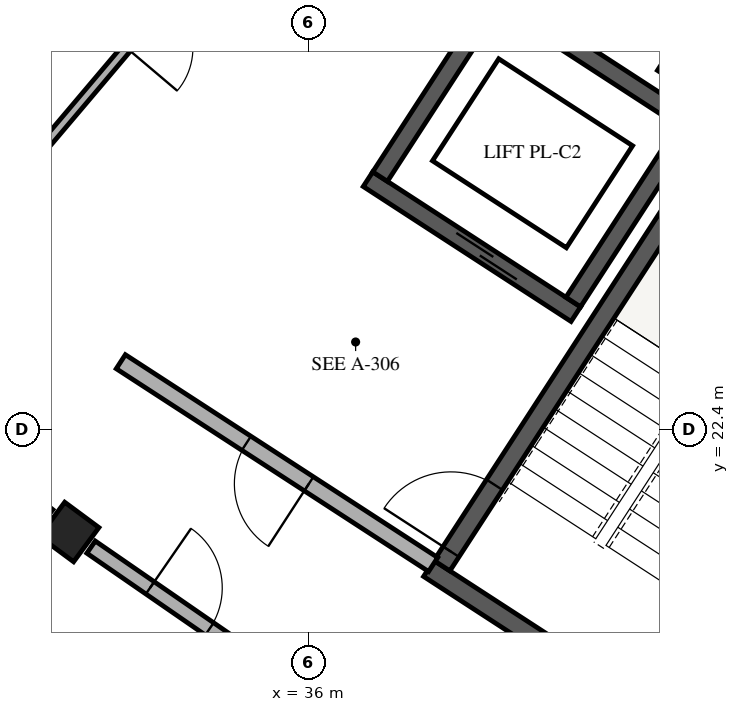
"""IFC4 building model, lengths in metres.
Left out: names, types, materials, properties, quantities, classifications, styles, units other than length and angle.
Written with IfcOpenShell. Run it as: python <this file> out.ifc"""

import sys

from ifc_helpers import new_model, si_unit, direction, frame, frame_2d, origin, origin_2d, place, context, subcontext, project, spatial, rectangle, extrude, element, fill, save


model = new_model("IFC4")
c1 = context("Model", 3, precision=1e-05, world=origin(), true_north=direction((0.0, 1.0)))
c2 = subcontext(c1, "Body", "Model", "MODEL_VIEW")
j1 = project(units=[si_unit("LENGTHUNIT", "METRE"), si_unit("PLANEANGLEUNIT", "RADIAN")], contexts=[c1])
p1 = place(None, origin())
s1 = spatial("IfcSite", under=j1, at=p1, CompositionType="ELEMENT")
p2 = place(p1, origin())
s2 = spatial("IfcBuilding", under=s1, at=p2, CompositionType="ELEMENT")
p3 = place(p2, frame((0.0, 0.0, 8.84)))
s3 = spatial("IfcBuildingStorey", under=s2, at=p3, CompositionType="ELEMENT", Elevation=8.84)
p4 = place(p3, frame((40.413, 18.882, 0.0), z_axis=(0.0, 0.0, 1.0), x_axis=(0.544629435258, 0.838676802022, 0.0)))
e1 = element("IfcWall", 1, at=p4, inside=s3, PredefinedType="SHEAR", context=c2, shape_type="SweptSolid", body=[
    extrude(rectangle(XDim=6.6, YDim=0.25, at=frame_2d((3.3, 0.0))), origin(), (0.0, 0.0, 1.0), 3.11),
])
p5 = place(p3, frame((40.449, 18.709, 0.0), z_axis=(0.0, 0.0, 1.0), x_axis=(-0.838678407117, 0.544626963559, 0.0)))
e2 = element("IfcWall", 2, at=p5, inside=s3, PredefinedType="SHEAR", context=c2, shape_type="SweptSolid", body=[
    extrude(rectangle(XDim=3.42, YDim=0.25, at=frame_2d((1.71, 0.0))), origin(), (0.0, 0.0, 1.0), 3.11),
])
p6 = place(p3, frame((37.754, 20.608, 0.0), z_axis=(0.0, 0.0, 1.0), x_axis=(0.544655453679, 0.838659905312, 0.0)))
e3 = element("IfcWall", 3, at=p6, inside=s3, PredefinedType="SHEAR", context=c2, shape_type="SweptSolid", body=[
    extrude(rectangle(XDim=6.6, YDim=0.25, at=frame_2d((3.3, 0.0))), origin(), (0.0, 0.0, 1.0), 3.11),
])
p7 = place(p6, frame((0.22, 0.0, 0.0)))
e4 = element("IfcOpeningElement", 4, at=p7, cuts=e3, PredefinedType="OPENING", context=c2, shape_type="SweptSolid", body=[
    extrude(rectangle(XDim=1.05, YDim=2.15, at=frame_2d((0.525, 1.075))), frame((0.0, 0.135, 0.0), z_axis=(0.0, -1.0, 0.0), x_axis=(1.0, 0.0, 0.0)), (0.0, 0.0, 1.0), 0.27),
])
p8 = place(p3, frame((39.516, 23.917, 0.0), z_axis=(0.0, 0.0, 1.0), x_axis=(-0.838660840752, 0.544654013286, 0.0)))
e5 = element("IfcWall", 5, at=p8, inside=s3, PredefinedType="SHEAR", context=c2, shape_type="SweptSolid", body=[
    extrude(rectangle(XDim=3.26, YDim=0.23, at=frame_2d((1.63, 0.0))), origin(), (0.0, 0.0, 1.0), 3.11),
])
p9 = place(p8, frame((0.9, 0.0, 0.0)))
e6 = element("IfcOpeningElement", 6, at=p9, cuts=e5, PredefinedType="OPENING", context=c2, shape_type="SweptSolid", body=[
    extrude(rectangle(XDim=1.0, YDim=2.15, at=frame_2d((0.5, 1.075))), frame((0.0, 0.125, 0.0), z_axis=(0.0, -1.0, 0.0), x_axis=(1.0, 0.0, 0.0)), (0.0, 0.0, 1.0), 0.25),
])
p10 = place(p3, frame((41.112, 26.375, 0.0), z_axis=(0.0, 0.0, 1.0), x_axis=(-0.838638623546, 0.544688221919, 0.0)))
e7 = element("IfcWall", 7, at=p10, inside=s3, PredefinedType="SHEAR", context=c2, shape_type="SweptSolid", body=[
    extrude(rectangle(XDim=3.26, YDim=0.23, at=frame_2d((1.63, 0.0))), origin(), (0.0, 0.0, 1.0), 3.11),
])
p11 = place(p3, frame((39.482, 24.077, 0.0), z_axis=(0.0, 0.0, 1.0), x_axis=(0.544686387605, 0.838639814913, 0.0)))
e8 = element("IfcWall", 8, at=p11, inside=s3, PredefinedType="SHEAR", context=c2, shape_type="SweptSolid", body=[
    extrude(rectangle(XDim=2.7, YDim=0.23, at=frame_2d((1.35, 0.0))), origin(), (0.0, 0.0, 1.0), 3.11),
])
p12 = place(p3, frame((36.941, 25.727, 0.0), z_axis=(0.0, 0.0, 1.0), x_axis=(0.544622789439, 0.838681117722, 0.0)))
e9 = element("IfcWall", 9, at=p12, inside=s3, PredefinedType="SHEAR", context=c2, shape_type="SweptSolid", body=[
    extrude(rectangle(XDim=2.7, YDim=0.23, at=frame_2d((1.35, 0.0))), origin(), (0.0, 0.0, 1.0), 3.11),
])
p13 = place(p3, frame((32.85, 21.052, 0.0), z_axis=(0.0, 0.0, 1.0), x_axis=(-0.594822786751, -0.803856860617, 0.0)))
e10 = element("IfcColumn", 10, at=p13, inside=s3, PredefinedType="COLUMN", context=c2, shape_type="SweptSolid", body=[
    extrude(rectangle(XDim=0.56, YDim=0.56, at=origin_2d()), origin(), (0.0, 0.0, 1.0), 3.105),
])
p14 = place(p3, frame((40.954, 27.116, 0.0), z_axis=(0.0, 0.0, 1.0), x_axis=(-0.540974471368, -0.841039012964, 0.0)))
e11 = element("IfcColumn", 11, at=p14, inside=s3, PredefinedType="PILASTER", context=c2, shape_type="SweptSolid", body=[
    extrude(rectangle(XDim=0.38, YDim=0.62, at=origin_2d()), origin(), (0.0, 0.0, 1.0), 3.105),
])
p15 = place(p3, frame((37.639, 20.623, 0.0), z_axis=(0.0, 0.0, 1.0), x_axis=(-0.838681446513, 0.544622283124, 0.0)))
e12 = element("IfcWall", 12, at=p15, inside=s3, PredefinedType="PARTITIONING", context=c2, shape_type="SweptSolid", body=[
    extrude(rectangle(XDim=4.9, YDim=0.22, at=frame_2d((2.45, 0.0))), origin(), (0.0, 0.0, 1.0), 2.34),
])
p16 = place(p15, frame((1.95, 0.0, 0.0)))
e13 = element("IfcOpeningElement", 13, at=p16, cuts=e12, PredefinedType="OPENING", context=c2, shape_type="SweptSolid", body=[
    extrude(rectangle(XDim=0.98, YDim=2.14, at=frame_2d((0.49, 1.07))), frame((0.0, 0.12, 0.0), z_axis=(0.0, -1.0, 0.0), x_axis=(1.0, 0.0, 0.0)), (0.0, 0.0, 1.0), 0.24),
])
p17 = place(p3, frame((36.021, 30.269, 0.0), z_axis=(0.0, 0.0, 1.0), x_axis=(-0.646121311019, -0.763234728932, 0.0)))
e14 = element("IfcWall", 14, at=p17, inside=s3, PredefinedType="PARTITIONING", context=c2, shape_type="SweptSolid", body=[
    extrude(rectangle(XDim=6.6, YDim=0.125, at=frame_2d((3.3, 0.0))), origin(), (0.0, 0.0, 1.0), 2.37),
])
p18 = place(p17, frame((2.865, 0.0, 0.0)))
e15 = element("IfcOpeningElement", 15, at=p18, cuts=e14, PredefinedType="OPENING", context=c2, shape_type="SweptSolid", body=[
    extrude(rectangle(XDim=0.87, YDim=2.08, at=frame_2d((0.435, 1.04))), frame((0.0, 0.073, 0.0), z_axis=(0.0, -1.0, 0.0), x_axis=(1.0, 0.0, 0.0)), (0.0, 0.0, 1.0), 0.145),
])
p19 = place(p3, frame((30.351, 23.03, 0.0), z_axis=(0.0, 0.0, 1.0), x_axis=(0.783965548427, -0.620804332201, 0.0)))
e16 = element("IfcWall", 16, at=p19, inside=s3, PredefinedType="PARTITIONING", context=c2, shape_type="SweptSolid", body=[
    extrude(rectangle(XDim=2.837, YDim=0.195, at=frame_2d((1.418, 0.0))), origin(), (0.0, 0.0, 1.0), 2.37),
])
p20 = place(p19, frame((0.934, 0.0, 0.0)))
e17 = element("IfcOpeningElement", 17, at=p20, cuts=e16, PredefinedType="OPENING", context=c2, shape_type="SweptSolid", body=[
    extrude(rectangle(XDim=0.97, YDim=2.15, at=frame_2d((0.485, 1.075))), frame((0.0, 0.107, 0.0), z_axis=(0.0, -1.0, 0.0), x_axis=(1.0, 0.0, 0.0)), (0.0, 0.0, 1.0), 0.215),
])
p21 = place(p3, frame((33.138, 20.853, 0.0), z_axis=(0.0, 0.0, 1.0), x_axis=(0.822870075235, -0.568229565653, 0.0)))
e18 = element("IfcWall", 18, at=p21, inside=s3, PredefinedType="PARTITIONING", context=c2, shape_type="SweptSolid", body=[
    extrude(rectangle(XDim=2.837, YDim=0.195, at=frame_2d((1.418, 0.0))), origin(), (0.0, 0.0, 1.0), 2.37),
])
p22 = place(p21, frame((0.944, 0.0, 0.0)))
e19 = element("IfcOpeningElement", 19, at=p22, cuts=e18, PredefinedType="OPENING", context=c2, shape_type="SweptSolid", body=[
    extrude(rectangle(XDim=0.95, YDim=2.13, at=frame_2d((0.475, 1.065))), frame((0.0, 0.107, 0.0), z_axis=(0.0, -1.0, 0.0), x_axis=(1.0, 0.0, 0.0)), (0.0, 0.0, 1.0), 0.215),
])
p23 = place(p7, origin())
e20 = element("IfcDoor", 20, at=p23, inside=s3, OperationType="SINGLE_SWING_LEFT", PredefinedType="DOOR", context=c2, shape_type="SweptSolid", body=[
    extrude(rectangle(XDim=1.05, YDim=2.15, at=frame_2d((0.525, 1.075))), frame((0.0, 0.025, 0.0), z_axis=(0.0, -1.0, 0.0), x_axis=(1.0, 0.0, 0.0)), (0.0, 0.0, 1.0), 0.05),
])
fill(e4, e20)
p24 = place(p9, origin())
e21 = element("IfcDoor", 21, at=p24, inside=s3, OperationType="DOUBLE_DOOR_SLIDING", PredefinedType="DOOR", context=c2, shape_type="SweptSolid", body=[
    extrude(rectangle(XDim=1.0, YDim=2.15, at=frame_2d((0.5, 1.075))), frame((0.0, 0.025, 0.0), z_axis=(0.0, -1.0, 0.0), x_axis=(1.0, 0.0, 0.0)), (0.0, 0.0, 1.0), 0.05),
])
fill(e6, e21)
p25 = place(p16, origin())
e22 = element("IfcDoor", 22, at=p25, inside=s3, OperationType="SINGLE_SWING_LEFT", PredefinedType="DOOR", context=c2, shape_type="SweptSolid", body=[
    extrude(rectangle(XDim=0.98, YDim=2.14, at=frame_2d((0.49, 1.07))), frame((0.0, 0.025, 0.0), z_axis=(0.0, -1.0, 0.0), x_axis=(1.0, 0.0, 0.0)), (0.0, 0.0, 1.0), 0.05),
])
fill(e13, e22)
p26 = place(p22, origin())
e23 = element("IfcDoor", 23, at=p26, inside=s3, OperationType="SINGLE_SWING_LEFT", PredefinedType="DOOR", context=c2, shape_type="SweptSolid", body=[
    extrude(rectangle(XDim=0.95, YDim=2.13, at=frame_2d((0.475, 1.065))), frame((0.0, 0.025, 0.0), z_axis=(0.0, -1.0, 0.0), x_axis=(1.0, 0.0, 0.0)), (0.0, 0.0, 1.0), 0.05),
])
fill(e19, e23)
save(model, sys.argv[1])
